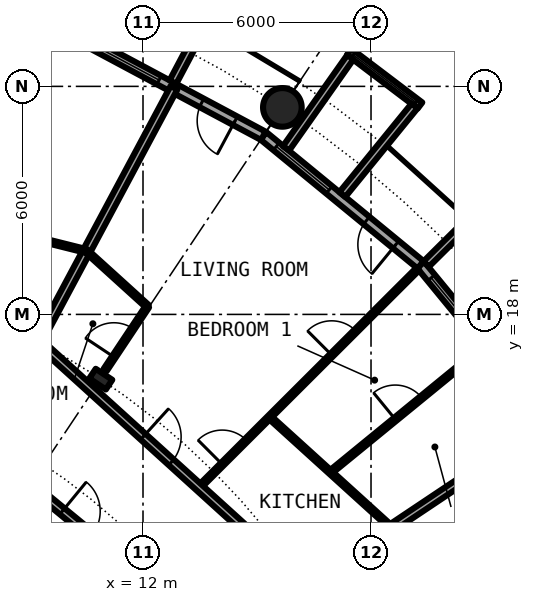
"""IFC4 building model, lengths in metres.
Left out: names, types, materials, properties, quantities, classifications, styles, units other than length and angle.
Written with IfcOpenShell. Run it as: python <this file> out.ifc"""

import sys

from ifc_helpers import new_model, si_unit, direction, frame, frame_2d, origin, origin_2d, place, context, subcontext, project, spatial, rectangle, circle, hollow_circle, i_section, extrude, element, fill, save


model = new_model("IFC4")
c1 = context("Model", 3, precision=1e-05, world=origin(), true_north=direction((0.0, 1.0)))
c2 = subcontext(c1, "Body", "Model", "MODEL_VIEW")
j1 = project(units=[si_unit("LENGTHUNIT", "METRE"), si_unit("PLANEANGLEUNIT", "RADIAN")], contexts=[c1])
p1 = place(None, origin())
s1 = spatial("IfcSite", under=j1, at=p1, CompositionType="ELEMENT")
p2 = place(p1, origin())
s2 = spatial("IfcBuilding", under=s1, at=p2, CompositionType="ELEMENT")
p3 = place(p2, frame((0.0, 0.0, 81.9)))
s3 = spatial("IfcBuildingStorey", under=s2, at=p3, CompositionType="ELEMENT", Elevation=81.9)
p4 = place(p3, frame((15.667, 23.448, 0.0), z_axis=(0.0, 0.0, 1.0), x_axis=(1.0, 0.0, 0.0)))
e1 = element("IfcColumn", 1, at=p4, inside=s3, PredefinedType="COLUMN", context=c2, shape_type="SweptSolid", body=[
    extrude(hollow_circle(Radius=0.508, WallThickness=0.04, at=origin_2d()), origin(), (0.0, 0.0, 1.0), 3.05),
])
p5 = place(p3, frame((10.889, 16.297, 0.0), z_axis=(0.0, 0.0, 1.0), x_axis=(0.55557023302, 0.831469612303, 0.0)))
e2 = element("IfcColumn", 2, at=p5, inside=s3, PredefinedType="COLUMN", context=c2, shape_type="SweptSolid", body=[
    extrude(i_section(OverallWidth=0.306, OverallDepth=0.524, WebThickness=0.021, FlangeThickness=0.04, FilletRadius=0.027, at=origin_2d()), origin(), (0.0, 0.0, 1.0), 3.05),
])
p6 = place(p3, frame((22.699, 15.167, 0.0), z_axis=(0.0, 0.0, 1.0), x_axis=(-0.634382322723, 0.773019449054, 0.0)))
e3 = element("IfcWall", 3, at=p6, inside=s3, PredefinedType="SOLIDWALL", context=c2, shape_type="SweptSolid", body=[
    extrude(rectangle(XDim=5.352, YDim=0.25, at=frame_2d((2.676, 0.0))), origin(), (0.0, 0.0, 1.0), 2.7),
])
p7 = place(p6, frame((0.841, 0.0, 0.0)))
e4 = element("IfcOpeningElement", 4, at=p7, cuts=e3, PredefinedType="OPENING", context=c2, shape_type="SweptSolid", body=[
    extrude(rectangle(XDim=1.0, YDim=2.2, at=frame_2d((0.5, 1.1))), frame((0.0, 0.135, 0.0), z_axis=(0.0, -1.0, 0.0), x_axis=(1.0, 0.0, 0.0)), (0.0, 0.0, 1.0), 0.27),
])
p8 = place(p6, frame((3.111, 0.0, 0.3)))
e5 = element("IfcOpeningElement", 5, at=p8, cuts=e3, PredefinedType="OPENING", context=c2, shape_type="SweptSolid", body=[
    extrude(rectangle(XDim=1.8, YDim=2.1, at=frame_2d((0.9, 1.05))), frame((0.0, 0.135, 0.0), z_axis=(0.0, -1.0, 0.0), x_axis=(1.0, 0.0, 0.0)), (0.0, 0.0, 1.0), 0.27),
])
p9 = place(p3, frame((19.45, 19.323, -0.03), z_axis=(0.0, 0.0, 1.0), x_axis=(0.709727076896, 0.704476739375, 0.0)))
e6 = element("IfcWall", 6, at=p9, inside=s3, PredefinedType="SOLIDWALL", context=c2, shape_type="SweptSolid", body=[
    extrude(rectangle(XDim=2.883, YDim=0.2, at=frame_2d((1.441, 0.0))), origin(), (0.0, 0.0, 1.0), 2.73),
])
p10 = place(p3, frame((19.304, 19.304, 0.0), z_axis=(0.0, 0.0, 1.0), x_axis=(-0.773019449054, 0.634382322723, 0.0)))
e7 = element("IfcWall", 7, at=p10, inside=s3, PredefinedType="SOLIDWALL", context=c2, shape_type="SweptSolid", body=[
    extrude(rectangle(XDim=5.352, YDim=0.25, at=frame_2d((2.676, 0.0))), origin(), (0.0, 0.0, 1.0), 2.7),
])
p11 = place(p10, frame((0.841, 0.0, 0.0)))
e8 = element("IfcOpeningElement", 8, at=p11, cuts=e7, PredefinedType="OPENING", context=c2, shape_type="SweptSolid", body=[
    extrude(rectangle(XDim=1.0, YDim=2.2, at=frame_2d((0.5, 1.1))), frame((0.0, 0.135, 0.0), z_axis=(0.0, -1.0, 0.0), x_axis=(1.0, 0.0, 0.0)), (0.0, 0.0, 1.0), 0.27),
])
p12 = place(p10, frame((3.111, 0.0, 0.3)))
e9 = element("IfcOpeningElement", 9, at=p12, cuts=e7, PredefinedType="OPENING", context=c2, shape_type="SweptSolid", body=[
    extrude(rectangle(XDim=1.8, YDim=2.1, at=frame_2d((0.9, 1.05))), frame((0.0, 0.135, 0.0), z_axis=(0.0, -1.0, 0.0), x_axis=(1.0, 0.0, 0.0)), (0.0, 0.0, 1.0), 0.27),
])
p13 = place(p3, frame((19.289, 23.497, -0.03), z_axis=(0.0, 0.0, 1.0), x_axis=(-0.796842165306, 0.60418752353, 0.0)))
e10 = element("IfcWall", 10, at=p13, inside=s3, PredefinedType="SOLIDWALL", context=c2, shape_type="SweptSolid", body=[
    extrude(rectangle(XDim=2.337, YDim=0.2, at=frame_2d((1.168, 0.0))), origin(), (0.0, 0.0, 1.0), 2.73),
])
p14 = place(p13, frame((0.128, 0.0, 0.33)))
e11 = element("IfcOpeningElement", 11, at=p14, cuts=e10, PredefinedType="OPENING", context=c2, shape_type="SweptSolid", body=[
    extrude(circle(Radius=1.04, at=frame_2d((1.04, 1.04))), frame((0.0, 0.11, 0.0), z_axis=(0.0, -1.0, 0.0), x_axis=(1.0, 0.0, 0.0)), (0.0, 0.0, 1.0), 0.22),
])
p15 = place(p3, frame((17.246, 21.155, -0.03), z_axis=(0.0, 0.0, 1.0), x_axis=(0.631741648902, 0.775179004516, 0.0)))
e12 = element("IfcWall", 12, at=p15, inside=s3, PredefinedType="SOLIDWALL", context=c2, shape_type="SweptSolid", body=[
    extrude(rectangle(XDim=3.006, YDim=0.2, at=frame_2d((1.503, 0.0))), origin(), (0.0, 0.0, 1.0), 2.73),
])
p16 = place(p3, frame((15.765, 22.37, -0.03), z_axis=(0.0, 0.0, 1.0), x_axis=(0.576274612209, 0.817256123454, 0.0)))
e13 = element("IfcWall", 13, at=p16, inside=s3, PredefinedType="SOLIDWALL", context=c2, shape_type="SweptSolid", body=[
    extrude(rectangle(XDim=2.933, YDim=0.2, at=frame_2d((1.466, 0.0))), origin(), (0.0, 0.0, 1.0), 2.73),
])
p17 = place(p3, frame((15.167, 22.699, 0.0), z_axis=(0.0, 0.0, 1.0), x_axis=(-0.881915646801, 0.471407246368, 0.0)))
e14 = element("IfcWall", 14, at=p17, inside=s3, PredefinedType="SOLIDWALL", context=c2, shape_type="SweptSolid", body=[
    extrude(rectangle(XDim=5.352, YDim=0.25, at=frame_2d((2.676, 0.0))), origin(), (0.0, 0.0, 1.0), 2.7),
])
p18 = place(p17, frame((0.841, 0.0, 0.0)))
e15 = element("IfcOpeningElement", 15, at=p18, cuts=e14, PredefinedType="OPENING", context=c2, shape_type="SweptSolid", body=[
    extrude(rectangle(XDim=1.0, YDim=2.2, at=frame_2d((0.5, 1.1))), frame((0.0, 0.135, 0.0), z_axis=(0.0, -1.0, 0.0), x_axis=(1.0, 0.0, 0.0)), (0.0, 0.0, 1.0), 0.27),
])
p19 = place(p17, frame((3.111, 0.0, 0.3)))
e16 = element("IfcOpeningElement", 16, at=p19, cuts=e14, PredefinedType="OPENING", context=c2, shape_type="SweptSolid", body=[
    extrude(rectangle(XDim=1.8, YDim=2.1, at=frame_2d((0.9, 1.05))), frame((0.0, 0.135, 0.0), z_axis=(0.0, -1.0, 0.0), x_axis=(1.0, 0.0, 0.0)), (0.0, 0.0, 1.0), 0.27),
])
p20 = place(p3, frame((12.787, 24.113, -0.03), z_axis=(0.0, 0.0, 1.0), x_axis=(0.468365282436, 0.883534924159, 0.0)))
e17 = element("IfcWall", 17, at=p20, inside=s3, PredefinedType="SOLIDWALL", context=c2, shape_type="SweptSolid", body=[
    extrude(rectangle(XDim=3.006, YDim=0.2, at=frame_2d((1.503, 0.0))), origin(), (0.0, 0.0, 1.0), 2.73),
])
p21 = place(p3, frame((9.244, 17.284, 0.0), z_axis=(0.0, 0.0, 1.0), x_axis=(0.471506520577, 0.881862574925, 0.0)))
e18 = element("IfcWall", 18, at=p21, inside=s3, PredefinedType="PARTITIONING", context=c2, shape_type="SweptSolid", body=[
    extrude(rectangle(XDim=7.574, YDim=0.2, at=frame_2d((3.787, 0.0))), origin(), (0.0, 0.0, 1.0), 2.7),
])
p22 = place(p3, frame((11.003, 16.536, 0.0), z_axis=(0.0, 0.0, 1.0), x_axis=(0.554112076035, 0.832442074376, 0.0)))
e19 = element("IfcWall", 19, at=p22, inside=s3, PredefinedType="PARTITIONING", context=c2, shape_type="SweptSolid", body=[
    extrude(rectangle(XDim=2.012, YDim=0.1, at=frame_2d((1.006, 0.0))), origin(), (0.0, 0.0, 1.0), 2.7),
])
p23 = place(p22, frame((0.414, 0.0, 0.0)))
e20 = element("IfcOpeningElement", 20, at=p23, cuts=e19, PredefinedType="OPENING", context=c2, shape_type="SweptSolid", body=[
    extrude(rectangle(XDim=0.9, YDim=2.3, at=frame_2d((0.45, 1.15))), frame((0.0, 0.06, 0.0), z_axis=(0.0, -1.0, 0.0), x_axis=(1.0, 0.0, 0.0)), (0.0, 0.0, 1.0), 0.12),
])
p24 = place(p3, frame((13.474, 13.448, 0.0), z_axis=(0.0, 0.0, 1.0), x_axis=(0.707766479207, 0.706446467123, 0.0)))
e21 = element("IfcWall", 21, at=p24, inside=s3, PredefinedType="PARTITIONING", context=c2, shape_type="SweptSolid", body=[
    extrude(rectangle(XDim=8.138, YDim=0.1, at=frame_2d((4.069, 0.0))), origin(), (0.0, 0.0, 1.0), 2.7),
])
p25 = place(p24, frame((0.861, 0.0, 0.0)))
e22 = element("IfcOpeningElement", 22, at=p25, cuts=e21, PredefinedType="OPENING", context=c2, shape_type="SweptSolid", body=[
    extrude(rectangle(XDim=0.9, YDim=2.3, at=frame_2d((0.45, 1.15))), frame((0.0, 0.06, 0.0), z_axis=(0.0, -1.0, 0.0), x_axis=(1.0, 0.0, 0.0)), (0.0, 0.0, 1.0), 0.12),
])
p26 = place(p24, frame((4.931, 0.0, 0.0)))
e23 = element("IfcOpeningElement", 23, at=p26, cuts=e21, PredefinedType="OPENING", context=c2, shape_type="SweptSolid", body=[
    extrude(rectangle(XDim=0.9, YDim=2.3, at=frame_2d((0.45, 1.15))), frame((0.0, 0.06, 0.0), z_axis=(0.0, -1.0, 0.0), x_axis=(1.0, 0.0, 0.0)), (0.0, 0.0, 1.0), 0.12),
])
p27 = place(p3, frame((16.515, 11.034, 0.0), z_axis=(0.0, 0.0, 1.0), x_axis=(0.831382022135, 0.555701298605, 0.0)))
e24 = element("IfcWall", 24, at=p27, inside=s3, PredefinedType="PARTITIONING", context=c2, shape_type="SweptSolid", body=[
    extrude(rectangle(XDim=7.313, YDim=0.2, at=frame_2d((3.657, 0.0))), origin(), (0.0, 0.0, 1.0), 2.7),
])
p28 = place(p3, frame((16.933, 13.848, 0.0), z_axis=(0.0, 0.0, 1.0), x_axis=(0.774219894911, 0.632916704097, 0.0)))
e25 = element("IfcWall", 25, at=p28, inside=s3, PredefinedType="PARTITIONING", context=c2, shape_type="SweptSolid", body=[
    extrude(rectangle(XDim=5.301, YDim=0.1, at=frame_2d((2.65, 0.0))), origin(), (0.0, 0.0, 1.0), 2.7),
])
p29 = place(p28, frame((2.201, 0.0, 0.0)))
e26 = element("IfcOpeningElement", 26, at=p29, cuts=e25, PredefinedType="OPENING", context=c2, shape_type="SweptSolid", body=[
    extrude(rectangle(XDim=0.9, YDim=2.3, at=frame_2d((0.45, 1.15))), frame((0.0, 0.06, 0.0), z_axis=(0.0, -1.0, 0.0), x_axis=(1.0, 0.0, 0.0)), (0.0, 0.0, 1.0), 0.12),
])
p30 = place(p3, frame((6.47, 15.613, 0.0), z_axis=(0.0, 0.0, 1.0), x_axis=(0.77292501819, -0.634497372931, 0.0)))
e27 = element("IfcWall", 27, at=p30, inside=s3, PredefinedType="PARTITIONING", context=c2, shape_type="SweptSolid", body=[
    extrude(rectangle(XDim=9.81, YDim=0.2, at=frame_2d((4.905, 0.0))), origin(), (0.0, 0.0, 1.0), 2.7),
])
p31 = place(p30, frame((4.404, 0.0, 0.0)))
e28 = element("IfcOpeningElement", 28, at=p31, cuts=e27, PredefinedType="OPENING", context=c2, shape_type="SweptSolid", body=[
    extrude(rectangle(XDim=1.0, YDim=2.3, at=frame_2d((0.5, 1.15))), frame((0.0, 0.11, 0.0), z_axis=(0.0, -1.0, 0.0), x_axis=(1.0, 0.0, 0.0)), (0.0, 0.0, 1.0), 0.22),
])
p32 = place(p3, frame((9.239, 17.286, 0.0), z_axis=(0.0, 0.0, 1.0), x_axis=(0.740909940942, -0.671604392044, 0.0)))
e29 = element("IfcWall", 29, at=p32, inside=s3, PredefinedType="PARTITIONING", context=c2, shape_type="SweptSolid", body=[
    extrude(rectangle(XDim=9.367, YDim=0.2, at=frame_2d((4.683, 0.0))), origin(), (0.0, 0.0, 1.0), 2.38),
])
p33 = place(p32, frame((3.731, 0.0, 0.0)))
e30 = element("IfcOpeningElement", 30, at=p33, cuts=e29, PredefinedType="OPENING", context=c2, shape_type="SweptSolid", body=[
    extrude(rectangle(XDim=1.0, YDim=2.3, at=frame_2d((0.5, 1.15))), frame((0.0, 0.11, 0.0), z_axis=(0.0, -1.0, 0.0), x_axis=(1.0, 0.0, 0.0)), (0.0, 0.0, 1.0), 0.22),
])
p34 = place(p3, frame((8.41, 20.193, 0.0), z_axis=(0.0, 0.0, 1.0), x_axis=(0.970076188308, -0.242800718444, 0.0)))
e31 = element("IfcWall", 31, at=p34, inside=s3, PredefinedType="PARTITIONING", context=c2, shape_type="SweptSolid", body=[
    extrude(rectangle(XDim=2.167, YDim=0.1, at=frame_2d((1.083, 0.0))), origin(), (0.0, 0.0, 1.0), 2.7),
])
p35 = place(p3, frame((10.512, 19.667, 0.0), z_axis=(0.0, 0.0, 1.0), x_axis=(0.740836325503, -0.671685595212, 0.0)))
e32 = element("IfcWall", 32, at=p35, inside=s3, PredefinedType="PARTITIONING", context=c2, shape_type="SweptSolid", body=[
    extrude(rectangle(XDim=2.168, YDim=0.1, at=frame_2d((1.084, 0.0))), origin(), (0.0, 0.0, 1.0), 2.7),
])
p36 = place(p3, frame((15.332, 15.297, 0.0), z_axis=(0.0, 0.0, 1.0), x_axis=(0.740836325503, -0.671685595212, 0.0)))
e33 = element("IfcWall", 33, at=p36, inside=s3, PredefinedType="PARTITIONING", context=c2, shape_type="SweptSolid", body=[
    extrude(rectangle(XDim=4.335, YDim=0.1, at=frame_2d((2.168, 0.0))), origin(), (0.0, 0.0, 1.0), 2.7),
])
p37 = place(p8, origin())
e34 = element("IfcWindow", 34, at=p37, inside=s3, PartitioningType="SINGLE_PANEL", PredefinedType="WINDOW", context=c2, shape_type="SweptSolid", body=[
    extrude(rectangle(XDim=1.8, YDim=2.1, at=frame_2d((0.9, 1.05))), frame((0.0, 0.03, 0.0), z_axis=(0.0, -1.0, 0.0), x_axis=(1.0, 0.0, 0.0)), (0.0, 0.0, 1.0), 0.06),
])
fill(e5, e34)
p38 = place(p11, origin())
e35 = element("IfcDoor", 35, at=p38, inside=s3, OperationType="SINGLE_SWING_LEFT", PredefinedType="DOOR", context=c2, shape_type="SweptSolid", body=[
    extrude(rectangle(XDim=1.0, YDim=2.2, at=frame_2d((0.5, 1.1))), frame((0.0, 0.025, 0.0), z_axis=(0.0, -1.0, 0.0), x_axis=(1.0, 0.0, 0.0)), (0.0, 0.0, 1.0), 0.05),
])
fill(e8, e35)
p39 = place(p12, origin())
e36 = element("IfcWindow", 36, at=p39, inside=s3, PartitioningType="SINGLE_PANEL", PredefinedType="WINDOW", context=c2, shape_type="SweptSolid", body=[
    extrude(rectangle(XDim=1.8, YDim=2.1, at=frame_2d((0.9, 1.05))), frame((0.0, 0.03, 0.0), z_axis=(0.0, -1.0, 0.0), x_axis=(1.0, 0.0, 0.0)), (0.0, 0.0, 1.0), 0.06),
])
fill(e9, e36)
p40 = place(p14, origin())
e37 = element("IfcWindow", 37, at=p40, inside=s3, PartitioningType="SINGLE_PANEL", PredefinedType="WINDOW", context=c2, shape_type="SweptSolid", body=[
    extrude(circle(Radius=1.04, at=frame_2d((1.04, 1.04))), frame((0.0, 0.03, 0.0), z_axis=(0.0, -1.0, 0.0), x_axis=(1.0, 0.0, 0.0)), (0.0, 0.0, 1.0), 0.06),
])
fill(e11, e37)
p41 = place(p18, origin())
e38 = element("IfcDoor", 38, at=p41, inside=s3, OperationType="SINGLE_SWING_LEFT", PredefinedType="DOOR", context=c2, shape_type="SweptSolid", body=[
    extrude(rectangle(XDim=1.0, YDim=2.2, at=frame_2d((0.5, 1.1))), frame((0.0, 0.025, 0.0), z_axis=(0.0, -1.0, 0.0), x_axis=(1.0, 0.0, 0.0)), (0.0, 0.0, 1.0), 0.05),
])
fill(e15, e38)
p42 = place(p19, origin())
e39 = element("IfcWindow", 39, at=p42, inside=s3, PartitioningType="SINGLE_PANEL", PredefinedType="WINDOW", context=c2, shape_type="SweptSolid", body=[
    extrude(rectangle(XDim=1.8, YDim=2.1, at=frame_2d((0.9, 1.05))), frame((0.0, 0.03, 0.0), z_axis=(0.0, -1.0, 0.0), x_axis=(1.0, 0.0, 0.0)), (0.0, 0.0, 1.0), 0.06),
])
fill(e16, e39)
p43 = place(p33, origin())
e40 = element("IfcDoor", 40, at=p43, inside=s3, OperationType="SINGLE_SWING_LEFT", PredefinedType="DOOR", context=c2, shape_type="SweptSolid", body=[
    extrude(rectangle(XDim=1.0, YDim=2.3, at=frame_2d((0.5, 1.15))), frame((0.0, 0.025, 0.0), z_axis=(0.0, -1.0, 0.0), x_axis=(1.0, 0.0, 0.0)), (0.0, 0.0, 1.0), 0.05),
])
fill(e30, e40)
p44 = place(p23, origin())
e41 = element("IfcDoor", 41, at=p44, inside=s3, OperationType="SINGLE_SWING_LEFT", PredefinedType="DOOR", context=c2, shape_type="SweptSolid", body=[
    extrude(rectangle(XDim=0.9, YDim=2.3, at=frame_2d((0.45, 1.15))), frame((0.0, 0.025, 0.0), z_axis=(0.0, -1.0, 0.0), x_axis=(1.0, 0.0, 0.0)), (0.0, 0.0, 1.0), 0.05),
])
fill(e20, e41)
p45 = place(p25, origin())
e42 = element("IfcDoor", 42, at=p45, inside=s3, OperationType="SINGLE_SWING_LEFT", PredefinedType="DOOR", context=c2, shape_type="SweptSolid", body=[
    extrude(rectangle(XDim=0.9, YDim=2.3, at=frame_2d((0.45, 1.15))), frame((0.0, 0.025, 0.0), z_axis=(0.0, -1.0, 0.0), x_axis=(1.0, 0.0, 0.0)), (0.0, 0.0, 1.0), 0.05),
])
fill(e22, e42)
p46 = place(p26, origin())
e43 = element("IfcDoor", 43, at=p46, inside=s3, OperationType="SINGLE_SWING_RIGHT", PredefinedType="DOOR", context=c2, shape_type="SweptSolid", body=[
    extrude(rectangle(XDim=0.9, YDim=2.3, at=frame_2d((0.45, 1.15))), frame((0.0, 0.025, 0.0), z_axis=(0.0, -1.0, 0.0), x_axis=(1.0, 0.0, 0.0)), (0.0, 0.0, 1.0), 0.05),
])
fill(e23, e43)
p47 = place(p29, origin())
e44 = element("IfcDoor", 44, at=p47, inside=s3, OperationType="SINGLE_SWING_RIGHT", PredefinedType="DOOR", context=c2, shape_type="SweptSolid", body=[
    extrude(rectangle(XDim=0.9, YDim=2.3, at=frame_2d((0.45, 1.15))), frame((0.0, 0.025, 0.0), z_axis=(0.0, -1.0, 0.0), x_axis=(1.0, 0.0, 0.0)), (0.0, 0.0, 1.0), 0.05),
])
fill(e26, e44)
p48 = place(p31, origin())
e45 = element("IfcDoor", 45, at=p48, inside=s3, OperationType="SINGLE_SWING_LEFT", PredefinedType="DOOR", context=c2, shape_type="SweptSolid", body=[
    extrude(rectangle(XDim=1.0, YDim=2.3, at=frame_2d((0.5, 1.15))), frame((0.0, 0.025, 0.0), z_axis=(0.0, -1.0, 0.0), x_axis=(1.0, 0.0, 0.0)), (0.0, 0.0, 1.0), 0.05),
])
fill(e28, e45)
save(model, sys.argv[1])
